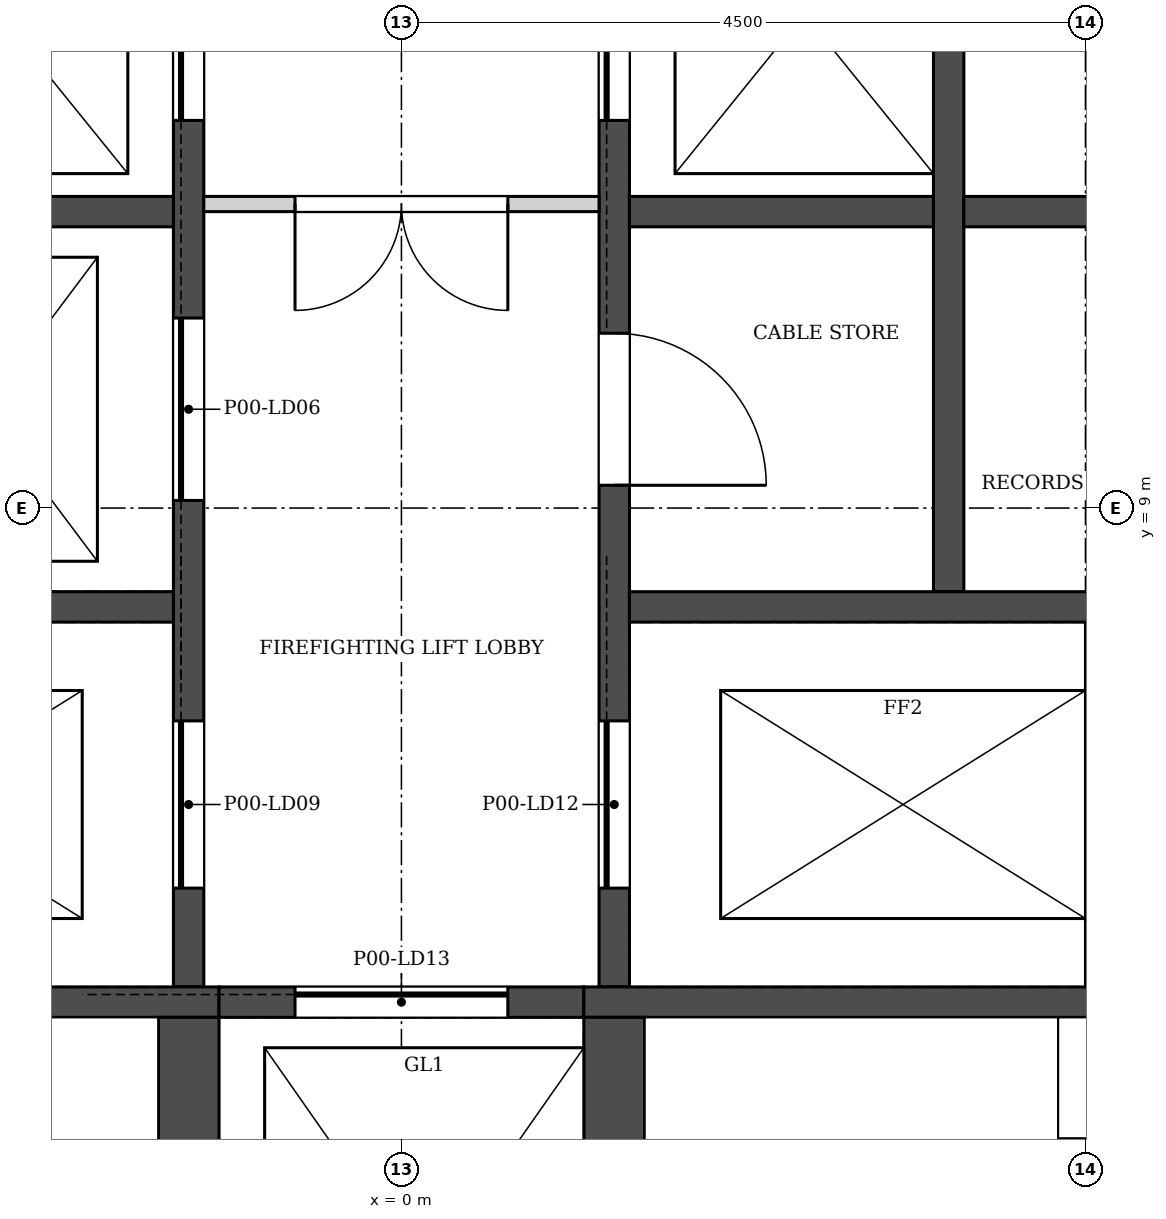
"""IFC4 building model, lengths in metres.
Left out: names, types, materials, properties, quantities, classifications, styles, units other than length and angle.
Written with IfcOpenShell. Run it as: python <this file> out.ifc"""

import sys

from ifc_helpers import new_model, si_unit, direction, frame, frame_2d, origin, place, context, subcontext, project, spatial, rectangle, extrude, element, fill, save


model = new_model("IFC4")
c1 = context("Model", 3, precision=1e-05, world=origin(), true_north=direction((0.0, 1.0)))
c2 = subcontext(c1, "Body", "Model", "MODEL_VIEW")
j1 = project(units=[si_unit("LENGTHUNIT", "METRE"), si_unit("PLANEANGLEUNIT", "RADIAN")], contexts=[c1])
p1 = place(None, origin())
s1 = spatial("IfcSite", under=j1, at=p1, CompositionType="ELEMENT")
p2 = place(p1, origin())
s2 = spatial("IfcBuilding", under=s1, at=p2, CompositionType="ELEMENT")
p3 = place(p2, origin())
s3 = spatial("IfcBuildingStorey", under=s2, at=p3, CompositionType="ELEMENT", Elevation=0.0)
p4 = place(p3, frame((3.6, 8.45, -0.4), z_axis=(0.0, 0.0, 1.0), x_axis=(0.0, 1.0, 0.0)))
e1 = element("IfcWall", 1, at=p4, inside=s3, PredefinedType="SOLIDWALL", context=c2, shape_type="SweptSolid", body=[
    extrude(rectangle(XDim=7.8, YDim=0.2, at=frame_2d((3.9, 0.0))), origin(), (0.0, 0.0, 1.0), 8.1),
])
p5 = place(p3, frame((-1.4, 5.85, -0.4), z_axis=(0.0, 0.0, 1.0), x_axis=(0.0, 1.0, 0.0)))
e2 = element("IfcWall", 2, at=p5, inside=s3, PredefinedType="SOLIDWALL", context=c2, shape_type="SweptSolid", body=[
    extrude(rectangle(XDim=11.75, YDim=0.2, at=frame_2d((5.875, 0.0))), origin(), (0.0, 0.0, 1.0), 8.1),
])
p6 = place(p5, frame((3.2, 0.0, 0.4)))
e3 = element("IfcOpeningElement", 3, at=p6, cuts=e2, PredefinedType="OPENING", context=c2, shape_type="SweptSolid", body=[
    extrude(rectangle(XDim=1.2, YDim=2.1, at=frame_2d((0.6, 1.05))), frame((0.0, 0.11, 0.0), z_axis=(0.0, -1.0, 0.0), x_axis=(1.0, 0.0, 0.0)), (0.0, 0.0, 1.0), 0.22),
])
p7 = place(p5, frame((5.7, 0.0, 0.4)))
e4 = element("IfcOpeningElement", 4, at=p7, cuts=e2, PredefinedType="OPENING", context=c2, shape_type="SweptSolid", body=[
    extrude(rectangle(XDim=1.4, YDim=2.1, at=frame_2d((0.7, 1.05))), frame((0.0, 0.11, 0.0), z_axis=(0.0, -1.0, 0.0), x_axis=(1.0, 0.0, 0.0)), (0.0, 0.0, 1.0), 0.22),
])
p8 = place(p5, frame((8.3, 0.0, 0.4)))
e5 = element("IfcOpeningElement", 5, at=p8, cuts=e2, PredefinedType="OPENING", context=c2, shape_type="SweptSolid", body=[
    extrude(rectangle(XDim=1.4, YDim=2.1, at=frame_2d((0.7, 1.05))), frame((0.0, 0.11, 0.0), z_axis=(0.0, -1.0, 0.0), x_axis=(1.0, 0.0, 0.0)), (0.0, 0.0, 1.0), 0.22),
])
p9 = place(p5, frame((0.65, 0.0, 0.4)))
e6 = element("IfcOpeningElement", 6, at=p9, cuts=e2, PredefinedType="OPENING", context=c2, shape_type="SweptSolid", body=[
    extrude(rectangle(XDim=1.1, YDim=2.1, at=frame_2d((0.55, 1.05))), frame((0.0, 0.11, 0.0), z_axis=(0.0, -1.0, 0.0), x_axis=(1.0, 0.0, 0.0)), (0.0, 0.0, 1.0), 0.22),
])
p10 = place(p3, frame((1.4, 5.85, -0.4), z_axis=(0.0, 0.0, 1.0), x_axis=(0.0, 1.0, 0.0)))
e7 = element("IfcWall", 7, at=p10, inside=s3, PredefinedType="SOLIDWALL", context=c2, shape_type="SweptSolid", body=[
    extrude(rectangle(XDim=11.75, YDim=0.2, at=frame_2d((5.875, 0.0))), origin(), (0.0, 0.0, 1.0), 8.1),
])
p11 = place(p10, frame((5.7, 0.0, 0.4)))
e8 = element("IfcOpeningElement", 8, at=p11, cuts=e7, PredefinedType="OPENING", context=c2, shape_type="SweptSolid", body=[
    extrude(rectangle(XDim=1.4, YDim=2.1, at=frame_2d((0.7, 1.05))), frame((0.0, 0.11, 0.0), z_axis=(0.0, -1.0, 0.0), x_axis=(1.0, 0.0, 0.0)), (0.0, 0.0, 1.0), 0.22),
])
p12 = place(p10, frame((8.4, 0.0, 0.4)))
e9 = element("IfcOpeningElement", 9, at=p12, cuts=e7, PredefinedType="OPENING", context=c2, shape_type="SweptSolid", body=[
    extrude(rectangle(XDim=1.2, YDim=2.1, at=frame_2d((0.6, 1.05))), frame((0.0, 0.11, 0.0), z_axis=(0.0, -1.0, 0.0), x_axis=(1.0, 0.0, 0.0)), (0.0, 0.0, 1.0), 0.22),
])
p13 = place(p10, frame((0.65, 0.0, 0.4)))
e10 = element("IfcOpeningElement", 10, at=p13, cuts=e7, PredefinedType="OPENING", context=c2, shape_type="SweptSolid", body=[
    extrude(rectangle(XDim=1.1, YDim=2.1, at=frame_2d((0.55, 1.05))), frame((0.0, 0.11, 0.0), z_axis=(0.0, -1.0, 0.0), x_axis=(1.0, 0.0, 0.0)), (0.0, 0.0, 1.0), 0.22),
])
p14 = place(p10, frame((3.3, 0.0, 0.4)))
e11 = element("IfcOpeningElement", 11, at=p14, cuts=e7, PredefinedType="OPENING", context=c2, shape_type="SweptSolid", body=[
    extrude(rectangle(XDim=1.0, YDim=2.1, at=frame_2d((0.5, 1.05))), frame((0.0, 0.11, 0.0), z_axis=(0.0, -1.0, 0.0), x_axis=(1.0, 0.0, 0.0)), (0.0, 0.0, 1.0), 0.22),
])
for number, where, z_axis, x_axis in (
    (12, (-5.7, 8.35, -0.4), (0.0, 0.0, 1.0), (1.0, 0.0, 0.0)),
    (13, (1.5, 8.35, -0.4), (0.0, 0.0, 1.0), (1.0, 0.0, 0.0)),
):
    element("IfcWall", number, at=place(p3, frame(where, z_axis=z_axis, x_axis=x_axis)), inside=s3, PredefinedType="SOLIDWALL", context=c2, shape_type="SweptSolid", body=[
        extrude(rectangle(XDim=4.2, YDim=0.2, at=frame_2d((2.1, 0.0))), origin(), (0.0, 0.0, 1.0), 8.1),
    ])
p15 = place(p3, frame((-12.6, 5.75, -0.4), z_axis=(0.0, 0.0, 1.0), x_axis=(1.0, 0.0, 0.0)))
e14 = element("IfcWall", 14, at=p15, inside=s3, PredefinedType="SOLIDWALL", context=c2, shape_type="SweptSolid", body=[
    extrude(rectangle(XDim=11.4, YDim=0.2, at=frame_2d((5.7, 0.0))), origin(), (0.0, 0.0, 1.0), 8.1),
])
p16 = place(p3, frame((-1.2, 5.75, -0.4), z_axis=(0.0, 0.0, 1.0), x_axis=(1.0, 0.0, 0.0)))
e15 = element("IfcWall", 15, at=p16, inside=s3, PredefinedType="SOLIDWALL", context=c2, shape_type="SweptSolid", body=[
    extrude(rectangle(XDim=2.4, YDim=0.2, at=frame_2d((1.2, 0.0))), origin(), (0.0, 0.0, 1.0), 8.1),
])
p17 = place(p16, frame((0.5, 0.0, 0.4)))
e16 = element("IfcOpeningElement", 16, at=p17, cuts=e15, PredefinedType="OPENING", context=c2, shape_type="SweptSolid", body=[
    extrude(rectangle(XDim=1.4, YDim=2.1, at=frame_2d((0.7, 1.05))), frame((0.0, 0.11, 0.0), z_axis=(0.0, -1.0, 0.0), x_axis=(1.0, 0.0, 0.0)), (0.0, 0.0, 1.0), 0.22),
])
p18 = place(p3, frame((1.2, 5.75, -0.4), z_axis=(0.0, 0.0, 1.0), x_axis=(1.0, 0.0, 0.0)))
e17 = element("IfcWall", 17, at=p18, inside=s3, PredefinedType="SOLIDWALL", context=c2, shape_type="SweptSolid", body=[
    extrude(rectangle(XDim=11.4, YDim=0.2, at=frame_2d((5.7, 0.0))), origin(), (0.0, 0.0, 1.0), 8.1),
])
for number, where, z_axis, x_axis in (
    (18, (-1.4, 2.25, -0.4), (0.0, 0.0, 1.0), (0.0, 1.0, 0.0)),
    (19, (1.4, 2.25, -0.4), (0.0, 0.0, 1.0), (0.0, 1.0, 0.0)),
):
    element("IfcWall", number, at=place(p3, frame(where, z_axis=z_axis, x_axis=x_axis)), inside=s3, PredefinedType="SOLIDWALL", context=c2, shape_type="SweptSolid", body=[
        extrude(rectangle(XDim=3.4, YDim=0.4, at=frame_2d((1.7, 0.0))), origin(), (0.0, 0.0, 1.0), 8.1),
    ])
for number, where, z_axis, x_axis in (
    (20, (-3.5, 10.95, -0.4), (0.0, 0.0, 1.0), (1.0, 0.0, 0.0)),
    (21, (3.7, 10.95, -0.4), (0.0, 0.0, 1.0), (1.0, 0.0, 0.0)),
    (22, (1.5, 10.95, -0.4), (0.0, 0.0, 1.0), (1.0, 0.0, 0.0)),
):
    element("IfcWall", number, at=place(p3, frame(where, z_axis=z_axis, x_axis=x_axis)), inside=s3, PredefinedType="SOLIDWALL", context=c2, shape_type="SweptSolid", body=[
        extrude(rectangle(XDim=2.0, YDim=0.2, at=frame_2d((1.0, 0.0))), origin(), (0.0, 0.0, 1.0), 8.1),
    ])
p19 = place(p3, frame((-1.3, 11.0, 0.0), z_axis=(0.0, 0.0, 1.0), x_axis=(1.0, 0.0, 0.0)))
e23 = element("IfcWall", 23, at=p19, inside=s3, PredefinedType="PARTITIONING", context=c2, shape_type="SweptSolid", body=[
    extrude(rectangle(XDim=2.6, YDim=0.1, at=frame_2d((1.3, 0.0))), origin(), (0.0, 0.0, 1.0), 7.7),
])
p20 = place(p19, frame((0.6, 0.0, 0.0)))
e24 = element("IfcOpeningElement", 24, at=p20, cuts=e23, PredefinedType="OPENING", context=c2, shape_type="SweptSolid", body=[
    extrude(rectangle(XDim=1.4, YDim=2.1, at=frame_2d((0.7, 1.05))), frame((0.0, 0.06, 0.0), z_axis=(0.0, -1.0, 0.0), x_axis=(1.0, 0.0, 0.0)), (0.0, 0.0, 1.0), 0.12),
])
p21 = place(p6, origin())
e25 = element("IfcDoor", 25, at=p21, inside=s3, OperationType="SLIDING_TO_LEFT", PredefinedType="DOOR", context=c2, shape_type="SweptSolid", body=[
    extrude(rectangle(XDim=1.2, YDim=2.1, at=frame_2d((0.6, 1.05))), frame((0.0, 0.025, 0.0), z_axis=(0.0, -1.0, 0.0), x_axis=(1.0, 0.0, 0.0)), (0.0, 0.0, 1.0), 0.05),
])
fill(e3, e25)
p22 = place(p7, origin())
e26 = element("IfcDoor", 26, at=p22, inside=s3, OperationType="SLIDING_TO_LEFT", PredefinedType="DOOR", context=c2, shape_type="SweptSolid", body=[
    extrude(rectangle(XDim=1.4, YDim=2.1, at=frame_2d((0.7, 1.05))), frame((0.0, 0.025, 0.0), z_axis=(0.0, -1.0, 0.0), x_axis=(1.0, 0.0, 0.0)), (0.0, 0.0, 1.0), 0.05),
])
fill(e4, e26)
p23 = place(p9, origin())
e27 = element("IfcDoor", 27, at=p23, inside=s3, OperationType="SLIDING_TO_RIGHT", PredefinedType="DOOR", context=c2, shape_type="SweptSolid", body=[
    extrude(rectangle(XDim=1.1, YDim=2.1, at=frame_2d((0.55, 1.05))), frame((0.0, 0.025, 0.0), z_axis=(0.0, -1.0, 0.0), x_axis=(1.0, 0.0, 0.0)), (0.0, 0.0, 1.0), 0.05),
])
fill(e6, e27)
p24 = place(p11, origin())
e28 = element("IfcDoor", 28, at=p24, inside=s3, OperationType="SLIDING_TO_LEFT", PredefinedType="DOOR", context=c2, shape_type="SweptSolid", body=[
    extrude(rectangle(XDim=1.4, YDim=2.1, at=frame_2d((0.7, 1.05))), frame((0.0, 0.025, 0.0), z_axis=(0.0, -1.0, 0.0), x_axis=(1.0, 0.0, 0.0)), (0.0, 0.0, 1.0), 0.05),
])
fill(e8, e28)
p25 = place(p13, origin())
e29 = element("IfcDoor", 29, at=p25, inside=s3, OperationType="SLIDING_TO_RIGHT", PredefinedType="DOOR", context=c2, shape_type="SweptSolid", body=[
    extrude(rectangle(XDim=1.1, YDim=2.1, at=frame_2d((0.55, 1.05))), frame((0.0, 0.025, 0.0), z_axis=(0.0, -1.0, 0.0), x_axis=(1.0, 0.0, 0.0)), (0.0, 0.0, 1.0), 0.05),
])
fill(e10, e29)
p26 = place(p17, origin())
e30 = element("IfcDoor", 30, at=p26, inside=s3, OperationType="SLIDING_TO_LEFT", PredefinedType="DOOR", context=c2, shape_type="SweptSolid", body=[
    extrude(rectangle(XDim=1.4, YDim=2.1, at=frame_2d((0.7, 1.05))), frame((0.0, 0.025, 0.0), z_axis=(0.0, -1.0, 0.0), x_axis=(1.0, 0.0, 0.0)), (0.0, 0.0, 1.0), 0.05),
])
fill(e16, e30)
p27 = place(p14, frame((1.0, 0.0, 0.0), z_axis=(0.0, 0.0, 1.0), x_axis=(-1.0, 0.0, 0.0)))
e31 = element("IfcDoor", 31, at=p27, inside=s3, OperationType="SINGLE_SWING_RIGHT", PredefinedType="DOOR", context=c2, shape_type="SweptSolid", body=[
    extrude(rectangle(XDim=1.0, YDim=2.1, at=frame_2d((0.5, 1.05))), frame((0.0, 0.025, 0.0), z_axis=(0.0, -1.0, 0.0), x_axis=(1.0, 0.0, 0.0)), (0.0, 0.0, 1.0), 0.05),
])
fill(e11, e31)
p28 = place(p20, frame((1.4, 0.0, 0.0), z_axis=(0.0, 0.0, 1.0), x_axis=(-1.0, 0.0, 0.0)))
e32 = element("IfcDoor", 32, at=p28, inside=s3, OperationType="DOUBLE_DOOR_SINGLE_SWING", PredefinedType="DOOR", context=c2, shape_type="SweptSolid", body=[
    extrude(rectangle(XDim=1.4, YDim=2.1, at=frame_2d((0.7, 1.05))), frame((0.0, 0.025, 0.0), z_axis=(0.0, -1.0, 0.0), x_axis=(1.0, 0.0, 0.0)), (0.0, 0.0, 1.0), 0.05),
])
fill(e24, e32)
save(model, sys.argv[1])
